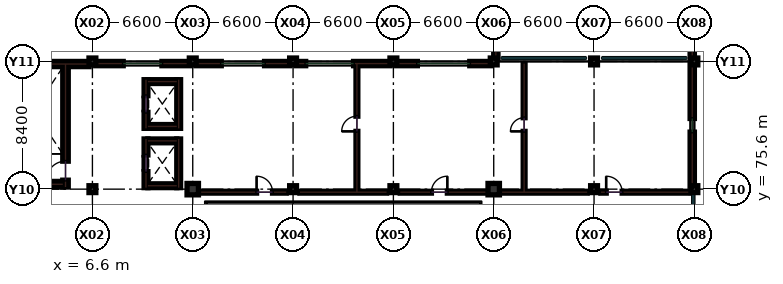
"""IFC4 building model, lengths in metres.
Left out: names, types, materials, properties, quantities, classifications, styles, units other than length and angle.
Written with IfcOpenShell. Run it as: python <this file> out.ifc"""

import sys

from ifc_helpers import new_model, si_unit, direction, frame, frame_2d, origin, origin_2d, place, context, subcontext, project, spatial, rectangle, circle, extrude, element, fill, save


model = new_model("IFC4")
c1 = context("Model", 3, precision=1e-05, world=origin(), true_north=direction((0.0, 1.0)))
c2 = subcontext(c1, "Body", "Model", "MODEL_VIEW")
j1 = project(units=[si_unit("LENGTHUNIT", "METRE"), si_unit("PLANEANGLEUNIT", "RADIAN")], contexts=[c1])
p1 = place(None, origin())
s1 = spatial("IfcSite", under=j1, at=p1, CompositionType="ELEMENT")
p2 = place(p1, origin())
s2 = spatial("IfcBuilding", under=s1, at=p2, CompositionType="ELEMENT")
p3 = place(p2, frame((0.0, 0.0, 14.4)))
s3 = spatial("IfcBuildingStorey", under=s2, at=p3, CompositionType="ELEMENT", Elevation=14.4)
for number, where, z_axis, x_axis in (
    (1, (6.6, 75.6, 0.0), (0.0, 0.0, 1.0), (1.0, 0.0, 0.0)),
    (2, (6.6, 84.0, 0.0), (0.0, 0.0, 1.0), (1.0, 0.0, 0.0)),
):
    element("IfcColumn", number, at=place(p3, frame(where, z_axis=z_axis, x_axis=x_axis)), inside=s3, PredefinedType="COLUMN", context=c2, shape_type="SweptSolid", body=[
        extrude(rectangle(XDim=0.45, YDim=0.45, at=origin_2d()), origin(), (0.0, 0.0, 1.0), 4.2),
    ])
p4 = place(p3, frame((13.2, 75.6, 0.0), z_axis=(0.0, 0.0, 1.0), x_axis=(1.0, 0.0, 0.0)))
e3 = element("IfcColumn", 3, at=p4, inside=s3, PredefinedType="COLUMN", context=c2, shape_type="SweptSolid", body=[
    extrude(circle(Radius=0.375, at=origin_2d()), origin(), (0.0, 0.0, 1.0), 4.2),
])
for number, where, z_axis, x_axis in (
    (4, (13.2, 84.0, 0.0), (0.0, 0.0, 1.0), (1.0, 0.0, 0.0)),
    (5, (19.8, 75.6, 0.0), (0.0, 0.0, 1.0), (1.0, 0.0, 0.0)),
    (6, (19.8, 84.0, 0.0), (0.0, 0.0, 1.0), (1.0, 0.0, 0.0)),
    (7, (26.4, 75.6, 0.0), (0.0, 0.0, 1.0), (1.0, 0.0, 0.0)),
    (8, (26.4, 84.0, 0.0), (0.0, 0.0, 1.0), (1.0, 0.0, 0.0)),
):
    element("IfcColumn", number, at=place(p3, frame(where, z_axis=z_axis, x_axis=x_axis)), inside=s3, PredefinedType="COLUMN", context=c2, shape_type="SweptSolid", body=[
        extrude(rectangle(XDim=0.45, YDim=0.45, at=origin_2d()), origin(), (0.0, 0.0, 1.0), 4.2),
    ])
p5 = place(p3, frame((33.0, 75.6, 0.0), z_axis=(0.0, 0.0, 1.0), x_axis=(1.0, 0.0, 0.0)))
e9 = element("IfcColumn", 9, at=p5, inside=s3, PredefinedType="COLUMN", context=c2, shape_type="SweptSolid", body=[
    extrude(circle(Radius=0.375, at=origin_2d()), origin(), (0.0, 0.0, 1.0), 4.2),
])
for number, where, z_axis, x_axis in (
    (10, (33.0, 84.0, 0.0), (0.0, 0.0, 1.0), (1.0, 0.0, 0.0)),
    (11, (39.6, 75.6, 0.0), (0.0, 0.0, 1.0), (1.0, 0.0, 0.0)),
    (12, (39.6, 84.0, 0.0), (0.0, 0.0, 1.0), (1.0, 0.0, 0.0)),
    (13, (46.2, 75.6, 0.0), (0.0, 0.0, 1.0), (1.0, 0.0, 0.0)),
    (14, (46.2, 84.0, 0.0), (0.0, 0.0, 1.0), (1.0, 0.0, 0.0)),
):
    element("IfcColumn", number, at=place(p3, frame(where, z_axis=z_axis, x_axis=x_axis)), inside=s3, PredefinedType="COLUMN", context=c2, shape_type="SweptSolid", body=[
        extrude(rectangle(XDim=0.45, YDim=0.45, at=origin_2d()), origin(), (0.0, 0.0, 1.0), 4.2),
    ])
p6 = place(p3, frame((12.9, 75.4, 0.0), z_axis=(0.0, 0.0, 1.0), x_axis=(1.0, 0.0, 0.0)))
e15 = element("IfcWall", 15, at=p6, inside=s3, PredefinedType="PARTITIONING", context=c2, shape_type="SweptSolid", body=[
    extrude(rectangle(XDim=6.45, YDim=0.12, at=frame_2d((3.225, 0.0))), origin(), (0.0, 0.0, 1.0), 3.19),
])
p7 = place(p6, frame((4.5, 0.0, 0.0)))
e16 = element("IfcOpeningElement", 16, at=p7, cuts=e15, PredefinedType="OPENING", context=c2, shape_type="SweptSolid", body=[
    extrude(rectangle(XDim=1.05, YDim=2.15, at=frame_2d((0.525, 1.075))), frame((0.0, 0.07, 0.0), z_axis=(0.0, -1.0, 0.0), x_axis=(1.0, 0.0, 0.0)), (0.0, 0.0, 1.0), 0.14),
])
p8 = place(p3, frame((20.25, 75.4, 0.0), z_axis=(0.0, 0.0, 1.0), x_axis=(1.0, 0.0, 0.0)))
e17 = element("IfcWall", 17, at=p8, inside=s3, PredefinedType="PARTITIONING", context=c2, shape_type="SweptSolid", body=[
    extrude(rectangle(XDim=5.7, YDim=0.12, at=frame_2d((2.85, 0.0))), origin(), (0.0, 0.0, 1.0), 3.19),
])
p9 = place(p3, frame((26.85, 75.4, 0.0), z_axis=(0.0, 0.0, 1.0), x_axis=(1.0, 0.0, 0.0)))
e18 = element("IfcWall", 18, at=p9, inside=s3, PredefinedType="PARTITIONING", context=c2, shape_type="SweptSolid", body=[
    extrude(rectangle(XDim=5.7, YDim=0.12, at=frame_2d((2.85, 0.0))), origin(), (0.0, 0.0, 1.0), 3.19),
])
p10 = place(p9, frame((2.05, 0.0, 0.0)))
e19 = element("IfcOpeningElement", 19, at=p10, cuts=e18, PredefinedType="OPENING", context=c2, shape_type="SweptSolid", body=[
    extrude(rectangle(XDim=1.05, YDim=2.15, at=frame_2d((0.525, 1.075))), frame((0.0, 0.07, 0.0), z_axis=(0.0, -1.0, 0.0), x_axis=(1.0, 0.0, 0.0)), (0.0, 0.0, 1.0), 0.14),
])
p11 = place(p3, frame((33.45, 75.4, 0.0), z_axis=(0.0, 0.0, 1.0), x_axis=(1.0, 0.0, 0.0)))
e20 = element("IfcWall", 20, at=p11, inside=s3, PredefinedType="PARTITIONING", context=c2, shape_type="SweptSolid", body=[
    extrude(rectangle(XDim=5.7, YDim=0.12, at=frame_2d((2.85, 0.0))), origin(), (0.0, 0.0, 1.0), 3.19),
])
p12 = place(p3, frame((40.05, 75.4, 0.0), z_axis=(0.0, 0.0, 1.0), x_axis=(1.0, 0.0, 0.0)))
e21 = element("IfcWall", 21, at=p12, inside=s3, PredefinedType="PARTITIONING", context=c2, shape_type="SweptSolid", body=[
    extrude(rectangle(XDim=5.9, YDim=0.12, at=frame_2d((2.95, 0.0))), origin(), (0.0, 0.0, 1.0), 3.19),
])
p13 = place(p12, frame((0.35, 0.0, 0.0)))
e22 = element("IfcOpeningElement", 22, at=p13, cuts=e21, PredefinedType="OPENING", context=c2, shape_type="SweptSolid", body=[
    extrude(rectangle(XDim=1.05, YDim=2.15, at=frame_2d((0.525, 1.075))), frame((0.0, 0.07, 0.0), z_axis=(0.0, -1.0, 0.0), x_axis=(1.0, 0.0, 0.0)), (0.0, 0.0, 1.0), 0.14),
])
p14 = place(p3, frame((24.0, 75.4, 0.0), z_axis=(0.0, 0.0, 1.0), x_axis=(0.0, 1.0, 0.0)))
e23 = element("IfcWall", 23, at=p14, inside=s3, PredefinedType="PARTITIONING", context=c2, shape_type="SweptSolid", body=[
    extrude(rectangle(XDim=8.46, YDim=0.12, at=frame_2d((4.23, 0.0))), origin(), (0.0, 0.0, 1.0), 3.19),
])
p15 = place(p14, frame((4.0, 0.0, 0.0)))
e24 = element("IfcOpeningElement", 24, at=p15, cuts=e23, PredefinedType="OPENING", context=c2, shape_type="SweptSolid", body=[
    extrude(rectangle(XDim=1.0, YDim=2.2, at=frame_2d((0.5, 1.1))), frame((0.0, 0.07, 0.0), z_axis=(0.0, -1.0, 0.0), x_axis=(1.0, 0.0, 0.0)), (0.0, 0.0, 1.0), 0.14),
])
p16 = place(p3, frame((35.0, 75.4, 0.0), z_axis=(0.0, 0.0, 1.0), x_axis=(0.0, 1.0, 0.0)))
e25 = element("IfcWall", 25, at=p16, inside=s3, PredefinedType="PARTITIONING", context=c2, shape_type="SweptSolid", body=[
    extrude(rectangle(XDim=8.46, YDim=0.12, at=frame_2d((4.23, 0.0))), origin(), (0.0, 0.0, 1.0), 3.19),
])
p17 = place(p16, frame((4.0, 0.0, 0.0)))
e26 = element("IfcOpeningElement", 26, at=p17, cuts=e25, PredefinedType="OPENING", context=c2, shape_type="SweptSolid", body=[
    extrude(rectangle(XDim=0.9, YDim=2.1, at=frame_2d((0.45, 1.05))), frame((0.0, 0.07, 0.0), z_axis=(0.0, -1.0, 0.0), x_axis=(1.0, 0.0, 0.0)), (0.0, 0.0, 1.0), 0.14),
])
p18 = place(p3, frame((6.38, 83.83, 0.0), z_axis=(0.0, 0.0, 1.0), x_axis=(-1.0, 0.0, 0.0)))
e27 = element("IfcWall", 27, at=p18, inside=s3, PredefinedType="SHEAR", context=c2, shape_type="SweptSolid", body=[
    extrude(rectangle(XDim=6.16, YDim=0.34, at=frame_2d((3.08, 0.0))), origin(), (0.0, 0.0, 1.0), 3.94),
])
p19 = place(p3, frame((12.98, 83.86, 0.0), z_axis=(0.0, 0.0, 1.0), x_axis=(-1.0, 0.0, 0.0)))
e28 = element("IfcWall", 28, at=p19, inside=s3, PredefinedType="SOLIDWALL", context=c2, shape_type="SweptSolid", body=[
    extrude(rectangle(XDim=6.16, YDim=0.28, at=frame_2d((3.08, 0.0))), origin(), (0.0, 0.0, 1.0), 2.935),
])
p20 = place(p19, frame((1.805, 0.0, 0.95)))
e29 = element("IfcOpeningElement", 29, at=p20, cuts=e28, PredefinedType="OPENING", context=c2, shape_type="SweptSolid", body=[
    extrude(rectangle(XDim=2.55, YDim=1.65, at=frame_2d((1.275, 0.825))), frame((0.0, 0.15, 0.0), z_axis=(0.0, -1.0, 0.0), x_axis=(1.0, 0.0, 0.0)), (0.0, 0.0, 1.0), 0.3),
])
p21 = place(p3, frame((19.58, 83.86, 0.0), z_axis=(0.0, 0.0, 1.0), x_axis=(-1.0, 0.0, 0.0)))
e30 = element("IfcWall", 30, at=p21, inside=s3, PredefinedType="SOLIDWALL", context=c2, shape_type="SweptSolid", body=[
    extrude(rectangle(XDim=6.16, YDim=0.28, at=frame_2d((3.08, 0.0))), origin(), (0.0, 0.0, 1.0), 2.935),
])
p22 = place(p21, frame((1.655, 0.0, 0.95)))
e31 = element("IfcOpeningElement", 31, at=p22, cuts=e30, PredefinedType="OPENING", context=c2, shape_type="SweptSolid", body=[
    extrude(rectangle(XDim=2.85, YDim=1.65, at=frame_2d((1.425, 0.825))), frame((0.0, 0.15, 0.0), z_axis=(0.0, -1.0, 0.0), x_axis=(1.0, 0.0, 0.0)), (0.0, 0.0, 1.0), 0.3),
])
p23 = place(p3, frame((26.18, 83.86, 0.0), z_axis=(0.0, 0.0, 1.0), x_axis=(-1.0, 0.0, 0.0)))
e32 = element("IfcWall", 32, at=p23, inside=s3, PredefinedType="SOLIDWALL", context=c2, shape_type="SweptSolid", body=[
    extrude(rectangle(XDim=6.16, YDim=0.28, at=frame_2d((3.08, 0.0))), origin(), (0.0, 0.0, 1.0), 2.935),
])
p24 = place(p23, frame((2.4, 0.0, 0.95)))
e33 = element("IfcOpeningElement", 33, at=p24, cuts=e32, PredefinedType="OPENING", context=c2, shape_type="SweptSolid", body=[
    extrude(rectangle(XDim=3.15, YDim=1.7, at=frame_2d((1.575, 0.85))), frame((0.0, 0.15, 0.0), z_axis=(0.0, -1.0, 0.0), x_axis=(1.0, 0.0, 0.0)), (0.0, 0.0, 1.0), 0.3),
])
p25 = place(p3, frame((32.78, 83.86, 0.0), z_axis=(0.0, 0.0, 1.0), x_axis=(-1.0, 0.0, 0.0)))
e34 = element("IfcWall", 34, at=p25, inside=s3, PredefinedType="SOLIDWALL", context=c2, shape_type="SweptSolid", body=[
    extrude(rectangle(XDim=6.16, YDim=0.28, at=frame_2d((3.08, 0.0))), origin(), (0.0, 0.0, 1.0), 2.935),
])
p26 = place(p25, frame((1.355, 0.0, 0.95)))
e35 = element("IfcOpeningElement", 35, at=p26, cuts=e34, PredefinedType="OPENING", context=c2, shape_type="SweptSolid", body=[
    extrude(rectangle(XDim=3.45, YDim=1.7, at=frame_2d((1.725, 0.85))), frame((0.0, 0.15, 0.0), z_axis=(0.0, -1.0, 0.0), x_axis=(1.0, 0.0, 0.0)), (0.0, 0.0, 1.0), 0.3),
])
p27 = place(p3, frame((33.14, 92.18, 0.0), z_axis=(0.0, 0.0, 1.0), x_axis=(0.0, -1.0, 0.0)))
e36 = element("IfcWall", 36, at=p27, inside=s3, PredefinedType="SOLIDWALL", context=c2, shape_type="SweptSolid", body=[
    extrude(rectangle(XDim=7.96, YDim=0.28, at=frame_2d((3.98, 0.0))), origin(), (0.0, 0.0, 1.0), 3.225),
])
p28 = place(p27, frame((3.33, 0.0, 0.95)))
e37 = element("IfcOpeningElement", 37, at=p28, cuts=e36, PredefinedType="OPENING", context=c2, shape_type="SweptSolid", body=[
    extrude(rectangle(XDim=1.3, YDim=1.75, at=frame_2d((0.65, 0.875))), frame((0.0, 0.15, 0.0), z_axis=(0.0, -1.0, 0.0), x_axis=(1.0, 0.0, 0.0)), (0.0, 0.0, 1.0), 0.3),
])
p29 = place(p3, frame((46.06, 75.82, 0.0), z_axis=(0.0, 0.0, 1.0), x_axis=(0.0, 1.0, 0.0)))
e38 = element("IfcWall", 38, at=p29, inside=s3, PredefinedType="SOLIDWALL", context=c2, shape_type="SweptSolid", body=[
    extrude(rectangle(XDim=7.96, YDim=0.28, at=frame_2d((3.98, 0.0))), origin(), (0.0, 0.0, 1.0), 2.605),
])
p30 = place(p29, frame((3.53, 0.0, 0.95)))
e39 = element("IfcOpeningElement", 39, at=p30, cuts=e38, PredefinedType="OPENING", context=c2, shape_type="SweptSolid", body=[
    extrude(rectangle(XDim=0.9, YDim=1.4, at=frame_2d((0.45, 0.7))), frame((0.0, 0.15, 0.0), z_axis=(0.0, -1.0, 0.0), x_axis=(1.0, 0.0, 0.0)), (0.0, 0.0, 1.0), 0.3),
])
p31 = place(p3, frame((46.06, 84.22, 0.0), z_axis=(0.0, 0.0, 1.0), x_axis=(0.0, 1.0, 0.0)))
e40 = element("IfcWall", 40, at=p31, inside=s3, PredefinedType="SOLIDWALL", context=c2, shape_type="SweptSolid", body=[
    extrude(rectangle(XDim=7.96, YDim=0.28, at=frame_2d((3.98, 0.0))), origin(), (0.0, 0.0, 1.0), 3.225),
])
p32 = place(p31, frame((3.33, 0.0, 0.95)))
e41 = element("IfcOpeningElement", 41, at=p32, cuts=e40, PredefinedType="OPENING", context=c2, shape_type="SweptSolid", body=[
    extrude(rectangle(XDim=1.3, YDim=1.75, at=frame_2d((0.65, 0.875))), frame((0.0, 0.15, 0.0), z_axis=(0.0, -1.0, 0.0), x_axis=(1.0, 0.0, 0.0)), (0.0, 0.0, 1.0), 0.3),
])
p33 = place(p3, frame((4.83, 75.74, 0.0), z_axis=(0.0, 0.0, 1.0), x_axis=(0.0, 1.0, 0.0)))
e42 = element("IfcWall", 42, at=p33, inside=s3, PredefinedType="SHEAR", context=c2, shape_type="SweptSolid", body=[
    extrude(rectangle(XDim=8.09, YDim=0.36, at=frame_2d((4.045, 0.0))), origin(), (0.0, 0.0, 1.0), 3.94),
])
p34 = place(p33, frame((0.45, 0.0, 0.0)))
e43 = element("IfcOpeningElement", 43, at=p34, cuts=e42, PredefinedType="OPENING", context=c2, shape_type="SweptSolid", body=[
    extrude(rectangle(XDim=1.25, YDim=2.15, at=frame_2d((0.625, 1.075))), frame((0.0, 0.19, 0.0), z_axis=(0.0, -1.0, 0.0), x_axis=(1.0, 0.0, 0.0)), (0.0, 0.0, 1.0), 0.38),
])
p35 = place(p3, frame((0.85, 75.92, 0.0), z_axis=(0.0, 0.0, 1.0), x_axis=(1.0, 0.0, 0.0)))
e44 = element("IfcWall", 44, at=p35, inside=s3, PredefinedType="SHEAR", context=c2, shape_type="SweptSolid", body=[
    extrude(rectangle(XDim=3.8, YDim=0.36, at=frame_2d((1.9, 0.0))), origin(), (0.0, 0.0, 1.0), 3.94),
])
p36 = place(p3, frame((10.125, 75.7, 0.0), z_axis=(0.0, 0.0, 1.0), x_axis=(0.0, 1.0, 0.0)))
e45 = element("IfcWall", 45, at=p36, inside=s3, PredefinedType="SHEAR", context=c2, shape_type="SweptSolid", body=[
    extrude(rectangle(XDim=3.2, YDim=0.25, at=frame_2d((1.6, 0.0))), origin(), (0.0, 0.0, 1.0), 3.94),
])
p37 = place(p36, frame((1.05, 0.0, 0.0)))
e46 = element("IfcOpeningElement", 46, at=p37, cuts=e45, PredefinedType="OPENING", context=c2, shape_type="SweptSolid", body=[
    extrude(rectangle(XDim=1.1, YDim=2.15, at=frame_2d((0.55, 1.075))), frame((0.0, 0.135, 0.0), z_axis=(0.0, -1.0, 0.0), x_axis=(1.0, 0.0, 0.0)), (0.0, 0.0, 1.0), 0.27),
])
p38 = place(p3, frame((12.275, 75.7, 0.0), z_axis=(0.0, 0.0, 1.0), x_axis=(0.0, 1.0, 0.0)))
e47 = element("IfcWall", 47, at=p38, inside=s3, PredefinedType="SHEAR", context=c2, shape_type="SweptSolid", body=[
    extrude(rectangle(XDim=3.2, YDim=0.25, at=frame_2d((1.6, 0.0))), origin(), (0.0, 0.0, 1.0), 3.94),
])
for number, where, z_axis, x_axis in (
    (48, (10.25, 75.825, 0.0), (0.0, 0.0, 1.0), (1.0, 0.0, 0.0)),
    (49, (10.25, 78.775, 0.0), (0.0, 0.0, 1.0), (1.0, 0.0, 0.0)),
):
    element("IfcWall", number, at=place(p3, frame(where, z_axis=z_axis, x_axis=x_axis)), inside=s3, PredefinedType="SHEAR", context=c2, shape_type="SweptSolid", body=[
        extrude(rectangle(XDim=1.9, YDim=0.25, at=frame_2d((0.95, 0.0))), origin(), (0.0, 0.0, 1.0), 3.94),
    ])
p39 = place(p3, frame((10.125, 79.6, 0.0), z_axis=(0.0, 0.0, 1.0), x_axis=(0.0, 1.0, 0.0)))
e50 = element("IfcWall", 50, at=p39, inside=s3, PredefinedType="SHEAR", context=c2, shape_type="SweptSolid", body=[
    extrude(rectangle(XDim=3.2, YDim=0.25, at=frame_2d((1.6, 0.0))), origin(), (0.0, 0.0, 1.0), 3.94),
])
p40 = place(p39, frame((1.05, 0.0, 0.0)))
e51 = element("IfcOpeningElement", 51, at=p40, cuts=e50, PredefinedType="OPENING", context=c2, shape_type="SweptSolid", body=[
    extrude(rectangle(XDim=1.1, YDim=2.15, at=frame_2d((0.55, 1.075))), frame((0.0, 0.135, 0.0), z_axis=(0.0, -1.0, 0.0), x_axis=(1.0, 0.0, 0.0)), (0.0, 0.0, 1.0), 0.27),
])
p41 = place(p3, frame((12.275, 79.6, 0.0), z_axis=(0.0, 0.0, 1.0), x_axis=(0.0, 1.0, 0.0)))
e52 = element("IfcWall", 52, at=p41, inside=s3, PredefinedType="SHEAR", context=c2, shape_type="SweptSolid", body=[
    extrude(rectangle(XDim=3.2, YDim=0.25, at=frame_2d((1.6, 0.0))), origin(), (0.0, 0.0, 1.0), 3.94),
])
for number, where, z_axis, x_axis in (
    (53, (10.25, 79.725, 0.0), (0.0, 0.0, 1.0), (1.0, 0.0, 0.0)),
    (54, (10.25, 82.675, 0.0), (0.0, 0.0, 1.0), (1.0, 0.0, 0.0)),
):
    element("IfcWall", number, at=place(p3, frame(where, z_axis=z_axis, x_axis=x_axis)), inside=s3, PredefinedType="SHEAR", context=c2, shape_type="SweptSolid", body=[
        extrude(rectangle(XDim=1.9, YDim=0.25, at=frame_2d((0.95, 0.0))), origin(), (0.0, 0.0, 1.0), 3.94),
    ])
p42 = place(p7, origin())
e55 = element("IfcDoor", 55, at=p42, inside=s3, OperationType="SINGLE_SWING_LEFT", PredefinedType="DOOR", context=c2, shape_type="SweptSolid", body=[
    extrude(rectangle(XDim=1.05, YDim=2.15, at=frame_2d((0.525, 1.075))), frame((0.0, 0.025, 0.0), z_axis=(0.0, -1.0, 0.0), x_axis=(1.0, 0.0, 0.0)), (0.0, 0.0, 1.0), 0.05),
])
fill(e16, e55)
p43 = place(p10, origin())
e56 = element("IfcDoor", 56, at=p43, inside=s3, OperationType="SINGLE_SWING_RIGHT", PredefinedType="DOOR", context=c2, shape_type="SweptSolid", body=[
    extrude(rectangle(XDim=1.05, YDim=2.15, at=frame_2d((0.525, 1.075))), frame((0.0, 0.025, 0.0), z_axis=(0.0, -1.0, 0.0), x_axis=(1.0, 0.0, 0.0)), (0.0, 0.0, 1.0), 0.05),
])
fill(e19, e56)
p44 = place(p13, origin())
e57 = element("IfcDoor", 57, at=p44, inside=s3, OperationType="SINGLE_SWING_LEFT", PredefinedType="DOOR", context=c2, shape_type="SweptSolid", body=[
    extrude(rectangle(XDim=1.05, YDim=2.15, at=frame_2d((0.525, 1.075))), frame((0.0, 0.025, 0.0), z_axis=(0.0, -1.0, 0.0), x_axis=(1.0, 0.0, 0.0)), (0.0, 0.0, 1.0), 0.05),
])
fill(e22, e57)
p45 = place(p15, origin())
e58 = element("IfcDoor", 58, at=p45, inside=s3, OperationType="SINGLE_SWING_LEFT", PredefinedType="DOOR", context=c2, shape_type="SweptSolid", body=[
    extrude(rectangle(XDim=1.0, YDim=2.2, at=frame_2d((0.5, 1.1))), frame((0.0, 0.025, 0.0), z_axis=(0.0, -1.0, 0.0), x_axis=(1.0, 0.0, 0.0)), (0.0, 0.0, 1.0), 0.05),
])
fill(e24, e58)
p46 = place(p17, origin())
e59 = element("IfcDoor", 59, at=p46, inside=s3, OperationType="SINGLE_SWING_LEFT", PredefinedType="DOOR", context=c2, shape_type="SweptSolid", body=[
    extrude(rectangle(XDim=0.9, YDim=2.1, at=frame_2d((0.45, 1.05))), frame((0.0, 0.025, 0.0), z_axis=(0.0, -1.0, 0.0), x_axis=(1.0, 0.0, 0.0)), (0.0, 0.0, 1.0), 0.05),
])
fill(e26, e59)
p47 = place(p20, origin())
e60 = element("IfcWindow", 60, at=p47, inside=s3, PartitioningType="SINGLE_PANEL", PredefinedType="WINDOW", context=c2, shape_type="SweptSolid", body=[
    extrude(rectangle(XDim=2.55, YDim=1.65, at=frame_2d((1.275, 0.825))), frame((0.0, 0.03, 0.0), z_axis=(0.0, -1.0, 0.0), x_axis=(1.0, 0.0, 0.0)), (0.0, 0.0, 1.0), 0.06),
])
fill(e29, e60)
p48 = place(p22, origin())
e61 = element("IfcWindow", 61, at=p48, inside=s3, PartitioningType="SINGLE_PANEL", PredefinedType="WINDOW", context=c2, shape_type="SweptSolid", body=[
    extrude(rectangle(XDim=2.85, YDim=1.65, at=frame_2d((1.425, 0.825))), frame((0.0, 0.03, 0.0), z_axis=(0.0, -1.0, 0.0), x_axis=(1.0, 0.0, 0.0)), (0.0, 0.0, 1.0), 0.06),
])
fill(e31, e61)
p49 = place(p24, origin())
e62 = element("IfcWindow", 62, at=p49, inside=s3, PartitioningType="SINGLE_PANEL", PredefinedType="WINDOW", context=c2, shape_type="SweptSolid", body=[
    extrude(rectangle(XDim=3.15, YDim=1.7, at=frame_2d((1.575, 0.85))), frame((0.0, 0.03, 0.0), z_axis=(0.0, -1.0, 0.0), x_axis=(1.0, 0.0, 0.0)), (0.0, 0.0, 1.0), 0.06),
])
fill(e33, e62)
p50 = place(p26, origin())
e63 = element("IfcWindow", 63, at=p50, inside=s3, PartitioningType="SINGLE_PANEL", PredefinedType="WINDOW", context=c2, shape_type="SweptSolid", body=[
    extrude(rectangle(XDim=3.45, YDim=1.7, at=frame_2d((1.725, 0.85))), frame((0.0, 0.03, 0.0), z_axis=(0.0, -1.0, 0.0), x_axis=(1.0, 0.0, 0.0)), (0.0, 0.0, 1.0), 0.06),
])
fill(e35, e63)
p51 = place(p30, origin())
e64 = element("IfcWindow", 64, at=p51, inside=s3, PartitioningType="SINGLE_PANEL", PredefinedType="WINDOW", context=c2, shape_type="SweptSolid", body=[
    extrude(rectangle(XDim=0.9, YDim=1.4, at=frame_2d((0.45, 0.7))), frame((0.0, 0.03, 0.0), z_axis=(0.0, -1.0, 0.0), x_axis=(1.0, 0.0, 0.0)), (0.0, 0.0, 1.0), 0.06),
])
fill(e39, e64)
p52 = place(p34, origin())
e65 = element("IfcDoor", 65, at=p52, inside=s3, OperationType="SINGLE_SWING_LEFT", PredefinedType="DOOR", context=c2, shape_type="SweptSolid", body=[
    extrude(rectangle(XDim=1.25, YDim=2.15, at=frame_2d((0.625, 1.075))), frame((0.0, 0.025, 0.0), z_axis=(0.0, -1.0, 0.0), x_axis=(1.0, 0.0, 0.0)), (0.0, 0.0, 1.0), 0.05),
])
fill(e43, e65)
p53 = place(p37, origin())
e66 = element("IfcDoor", 66, at=p53, inside=s3, OperationType="SLIDING_TO_LEFT", PredefinedType="DOOR", context=c2, shape_type="SweptSolid", body=[
    extrude(rectangle(XDim=1.1, YDim=2.15, at=frame_2d((0.55, 1.075))), frame((0.0, 0.025, 0.0), z_axis=(0.0, -1.0, 0.0), x_axis=(1.0, 0.0, 0.0)), (0.0, 0.0, 1.0), 0.05),
])
fill(e46, e66)
p54 = place(p40, origin())
e67 = element("IfcDoor", 67, at=p54, inside=s3, OperationType="SLIDING_TO_LEFT", PredefinedType="DOOR", context=c2, shape_type="SweptSolid", body=[
    extrude(rectangle(XDim=1.1, YDim=2.15, at=frame_2d((0.55, 1.075))), frame((0.0, 0.025, 0.0), z_axis=(0.0, -1.0, 0.0), x_axis=(1.0, 0.0, 0.0)), (0.0, 0.0, 1.0), 0.05),
])
fill(e51, e67)
save(model, sys.argv[1])
